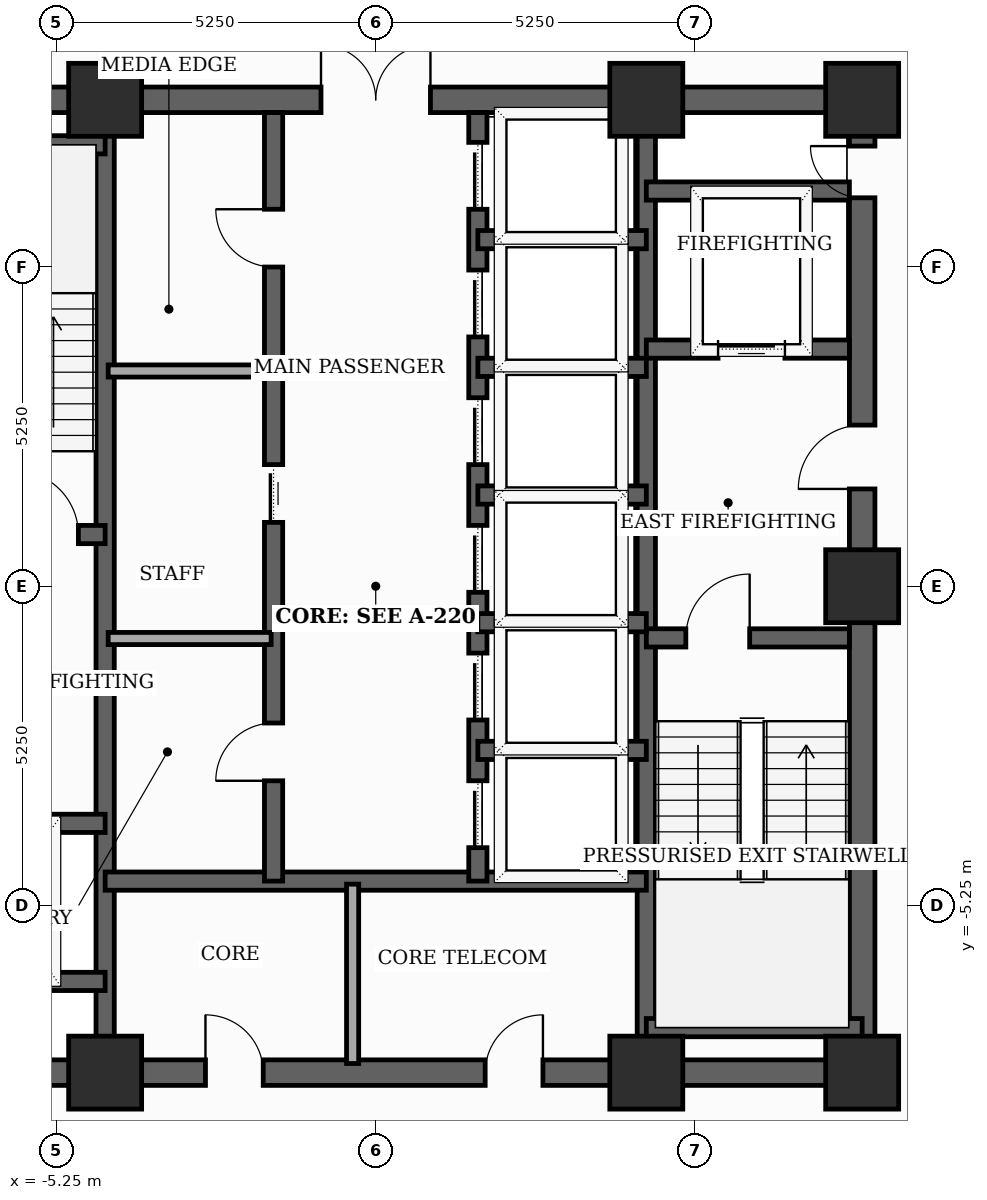
"""IFC4 building model, lengths in metres.
Left out: names, types, materials, properties, quantities, classifications, styles, units other than length and angle.
Written with IfcOpenShell. Run it as: python <this file> out.ifc"""

import sys

from ifc_helpers import new_model, si_unit, direction, frame, frame_2d, origin, origin_2d, place, context, subcontext, project, spatial, rectangle, extrude, element, fill, save


model = new_model("IFC4")
c1 = context("Model", 3, precision=1e-05, world=origin(), true_north=direction((0.0, 1.0)))
c2 = subcontext(c1, "Body", "Model", "MODEL_VIEW")
j1 = project(units=[si_unit("LENGTHUNIT", "METRE"), si_unit("PLANEANGLEUNIT", "RADIAN")], contexts=[c1])
p1 = place(None, origin())
s1 = spatial("IfcSite", under=j1, at=p1, CompositionType="ELEMENT")
p2 = place(p1, origin())
s2 = spatial("IfcBuilding", under=s1, at=p2, CompositionType="ELEMENT")
p3 = place(p2, frame((0.0, 0.0, 195.3)))
s3 = spatial("IfcBuildingStorey", under=s2, at=p3, CompositionType="ELEMENT", Elevation=195.3)
for number, where, z_axis, x_axis in (
    (1, (-4.45, -8.0, 0.0), (0.0, 0.0, 1.0), (1.0, 0.0, 0.0)),
    (2, (4.45, -8.0, 0.0), (0.0, 0.0, 1.0), (1.0, 0.0, 0.0)),
    (3, (8.0, -8.0, 0.0), (0.0, 0.0, 1.0), (1.0, 0.0, 0.0)),
    (4, (8.0, 0.0, 0.0), (0.0, 0.0, 1.0), (1.0, 0.0, 0.0)),
    (5, (8.0, 8.0, 0.0), (0.0, 0.0, 1.0), (1.0, 0.0, 0.0)),
    (6, (4.45, 8.0, 0.0), (0.0, 0.0, 1.0), (1.0, 0.0, 0.0)),
    (7, (-4.45, 8.0, 0.0), (0.0, 0.0, 1.0), (1.0, 0.0, 0.0)),
):
    element("IfcColumn", number, at=place(p3, frame(where, z_axis=z_axis, x_axis=x_axis)), inside=s3, PredefinedType="COLUMN", context=c2, shape_type="SweptSolid", body=[
        extrude(rectangle(XDim=1.2, YDim=1.2, at=origin_2d()), origin(), (0.0, 0.0, 1.0), 3.7),
    ])
p4 = place(p3, frame((8.0, -8.0, 0.0), z_axis=(0.0, 0.0, 1.0), x_axis=(0.0, 1.0, 0.0)))
e8 = element("IfcWall", 8, at=p4, inside=s3, PredefinedType="SHEAR", context=c2, shape_type="SweptSolid", body=[
    extrude(rectangle(XDim=16.0, YDim=0.42, at=frame_2d((8.0, 0.0))), origin(), (0.0, 0.0, 1.0), 3.5),
])
p5 = place(p4, frame((9.6, 0.0, 0.0)))
e9 = element("IfcOpeningElement", 9, at=p5, cuts=e8, PredefinedType="OPENING", context=c2, shape_type="SweptSolid", body=[
    extrude(rectangle(XDim=1.05, YDim=2.15, at=frame_2d((0.525, 1.075))), frame((0.0, 0.22, 0.0), z_axis=(0.0, -1.0, 0.0), x_axis=(1.0, 0.0, 0.0)), (0.0, 0.0, 1.0), 0.44),
])
p6 = place(p4, frame((14.389, 0.0, 0.0)))
e10 = element("IfcOpeningElement", 10, at=p6, cuts=e8, PredefinedType="OPENING", context=c2, shape_type="SweptSolid", body=[
    extrude(rectangle(XDim=0.85, YDim=2.02, at=frame_2d((0.425, 1.01))), frame((0.0, 0.22, 0.0), z_axis=(0.0, -1.0, 0.0), x_axis=(1.0, 0.0, 0.0)), (0.0, 0.0, 1.0), 0.44),
])
p7 = place(p3, frame((-8.0, -8.0, 0.0), z_axis=(0.0, 0.0, 1.0), x_axis=(1.0, 0.0, 0.0)))
e11 = element("IfcWall", 11, at=p7, inside=s3, PredefinedType="SHEAR", context=c2, shape_type="SweptSolid", body=[
    extrude(rectangle(XDim=16.0, YDim=0.42, at=frame_2d((8.0, 0.0))), origin(), (0.0, 0.0, 1.0), 3.5),
])
p8 = place(p7, frame((5.2, 0.0, 0.0)))
e12 = element("IfcOpeningElement", 12, at=p8, cuts=e11, PredefinedType="OPENING", context=c2, shape_type="SweptSolid", body=[
    extrude(rectangle(XDim=0.95, YDim=2.1, at=frame_2d((0.475, 1.05))), frame((0.0, 0.22, 0.0), z_axis=(0.0, -1.0, 0.0), x_axis=(1.0, 0.0, 0.0)), (0.0, 0.0, 1.0), 0.44),
])
p9 = place(p7, frame((9.8, 0.0, 0.0)))
e13 = element("IfcOpeningElement", 13, at=p9, cuts=e11, PredefinedType="OPENING", context=c2, shape_type="SweptSolid", body=[
    extrude(rectangle(XDim=0.95, YDim=2.1, at=frame_2d((0.475, 1.05))), frame((0.0, 0.22, 0.0), z_axis=(0.0, -1.0, 0.0), x_axis=(1.0, 0.0, 0.0)), (0.0, 0.0, 1.0), 0.44),
])
p10 = place(p3, frame((-8.0, 8.0, 0.0), z_axis=(0.0, 0.0, 1.0), x_axis=(1.0, 0.0, 0.0)))
e14 = element("IfcWall", 14, at=p10, inside=s3, PredefinedType="SHEAR", context=c2, shape_type="SweptSolid", body=[
    extrude(rectangle(XDim=16.0, YDim=0.42, at=frame_2d((8.0, 0.0))), origin(), (0.0, 0.0, 1.0), 3.5),
])
p11 = place(p10, frame((7.1, 0.0, 0.0)))
e15 = element("IfcOpeningElement", 15, at=p11, cuts=e14, PredefinedType="OPENING", context=c2, shape_type="SweptSolid", body=[
    extrude(rectangle(XDim=1.8, YDim=2.15, at=frame_2d((0.9, 1.075))), frame((0.0, 0.22, 0.0), z_axis=(0.0, -1.0, 0.0), x_axis=(1.0, 0.0, 0.0)), (0.0, 0.0, 1.0), 0.44),
])
for number, where, z_axis, x_axis in (
    (16, (-4.45, -7.79, 0.0), (0.0, 0.0, 1.0), (0.0, 1.0, 0.0)),
    (17, (4.45, -7.79, 0.0), (0.0, 0.0, 1.0), (0.0, 1.0, 0.0)),
):
    element("IfcWall", number, at=place(p3, frame(where, z_axis=z_axis, x_axis=x_axis)), inside=s3, PredefinedType="SHEAR", context=c2, shape_type="SweptSolid", body=[
        extrude(rectangle(XDim=15.58, YDim=0.3, at=frame_2d((7.79, 0.0))), origin(), (0.0, 0.0, 1.0), 3.5),
    ])
p12 = place(p3, frame((-7.79, 0.85, 0.0), z_axis=(0.0, 0.0, 1.0), x_axis=(1.0, 0.0, 0.0)))
e18 = element("IfcWall", 18, at=p12, inside=s3, PredefinedType="SHEAR", context=c2, shape_type="SweptSolid", body=[
    extrude(rectangle(XDim=3.34, YDim=0.3, at=frame_2d((1.67, 0.0))), origin(), (0.0, 0.0, 1.0), 3.5),
])
p13 = place(p12, frame((1.85, 0.0, 0.0)))
e19 = element("IfcOpeningElement", 19, at=p13, cuts=e18, PredefinedType="OPENING", context=c2, shape_type="SweptSolid", body=[
    extrude(rectangle(XDim=1.05, YDim=2.15, at=frame_2d((0.525, 1.075))), frame((0.0, 0.16, 0.0), z_axis=(0.0, -1.0, 0.0), x_axis=(1.0, 0.0, 0.0)), (0.0, 0.0, 1.0), 0.32),
])
p14 = place(p3, frame((-7.79, 7.26, 0.0), z_axis=(0.0, 0.0, 1.0), x_axis=(1.0, 0.0, 0.0)))
e20 = element("IfcWall", 20, at=p14, inside=s3, PredefinedType="SHEAR", context=c2, shape_type="SweptSolid", body=[
    extrude(rectangle(XDim=3.34, YDim=0.3, at=frame_2d((1.67, 0.0))), origin(), (0.0, 0.0, 1.0), 3.5),
])
p15 = place(p3, frame((4.45, -0.85, 0.0), z_axis=(0.0, 0.0, 1.0), x_axis=(1.0, 0.0, 0.0)))
e21 = element("IfcWall", 21, at=p15, inside=s3, PredefinedType="SHEAR", context=c2, shape_type="SweptSolid", body=[
    extrude(rectangle(XDim=3.34, YDim=0.3, at=frame_2d((1.67, 0.0))), origin(), (0.0, 0.0, 1.0), 3.5),
])
p16 = place(p15, frame((0.65, 0.0, 0.0)))
e22 = element("IfcOpeningElement", 22, at=p16, cuts=e21, PredefinedType="OPENING", context=c2, shape_type="SweptSolid", body=[
    extrude(rectangle(XDim=1.05, YDim=2.15, at=frame_2d((0.525, 1.075))), frame((0.0, 0.16, 0.0), z_axis=(0.0, -1.0, 0.0), x_axis=(1.0, 0.0, 0.0)), (0.0, 0.0, 1.0), 0.32),
])
p17 = place(p3, frame((4.45, -7.26, 0.0), z_axis=(0.0, 0.0, 1.0), x_axis=(1.0, 0.0, 0.0)))
e23 = element("IfcWall", 23, at=p17, inside=s3, PredefinedType="SHEAR", context=c2, shape_type="SweptSolid", body=[
    extrude(rectangle(XDim=3.55, YDim=0.3, at=frame_2d((1.775, 0.0))), origin(), (0.0, 0.0, 1.0), 3.5),
])
p18 = place(p3, frame((-7.79, -3.9, 0.0), z_axis=(0.0, 0.0, 1.0), x_axis=(1.0, 0.0, 0.0)))
e24 = element("IfcWall", 24, at=p18, inside=s3, PredefinedType="SHEAR", context=c2, shape_type="SweptSolid", body=[
    extrude(rectangle(XDim=3.34, YDim=0.3, at=frame_2d((1.67, 0.0))), origin(), (0.0, 0.0, 1.0), 3.5),
])
p19 = place(p18, frame((1.27, 0.0, 0.0)))
e25 = element("IfcOpeningElement", 25, at=p19, cuts=e24, PredefinedType="OPENING", context=c2, shape_type="SweptSolid", body=[
    extrude(rectangle(XDim=1.1, YDim=2.1, at=frame_2d((0.55, 1.05))), frame((0.0, 0.16, 0.0), z_axis=(0.0, -1.0, 0.0), x_axis=(1.0, 0.0, 0.0)), (0.0, 0.0, 1.0), 0.32),
])
p20 = place(p3, frame((-7.79, -6.5, 0.0), z_axis=(0.0, 0.0, 1.0), x_axis=(1.0, 0.0, 0.0)))
e26 = element("IfcWall", 26, at=p20, inside=s3, PredefinedType="SHEAR", context=c2, shape_type="SweptSolid", body=[
    extrude(rectangle(XDim=3.34, YDim=0.3, at=frame_2d((1.67, 0.0))), origin(), (0.0, 0.0, 1.0), 3.5),
])
p21 = place(p3, frame((4.45, 3.9, 0.0), z_axis=(0.0, 0.0, 1.0), x_axis=(1.0, 0.0, 0.0)))
e27 = element("IfcWall", 27, at=p21, inside=s3, PredefinedType="SHEAR", context=c2, shape_type="SweptSolid", body=[
    extrude(rectangle(XDim=3.34, YDim=0.3, at=frame_2d((1.67, 0.0))), origin(), (0.0, 0.0, 1.0), 3.5),
])
p22 = place(p21, frame((1.18, 0.0, 0.0)))
e28 = element("IfcOpeningElement", 28, at=p22, cuts=e27, PredefinedType="OPENING", context=c2, shape_type="SweptSolid", body=[
    extrude(rectangle(XDim=1.1, YDim=2.1, at=frame_2d((0.55, 1.05))), frame((0.0, 0.16, 0.0), z_axis=(0.0, -1.0, 0.0), x_axis=(1.0, 0.0, 0.0)), (0.0, 0.0, 1.0), 0.32),
])
p23 = place(p3, frame((4.45, 6.5, 0.0), z_axis=(0.0, 0.0, 1.0), x_axis=(1.0, 0.0, 0.0)))
e29 = element("IfcWall", 29, at=p23, inside=s3, PredefinedType="SHEAR", context=c2, shape_type="SweptSolid", body=[
    extrude(rectangle(XDim=3.34, YDim=0.3, at=frame_2d((1.67, 0.0))), origin(), (0.0, 0.0, 1.0), 3.5),
])
p24 = place(p3, frame((-4.45, -4.85, 0.0), z_axis=(0.0, 0.0, 1.0), x_axis=(1.0, 0.0, 0.0)))
e30 = element("IfcWall", 30, at=p24, inside=s3, PredefinedType="SHEAR", context=c2, shape_type="SweptSolid", body=[
    extrude(rectangle(XDim=8.9, YDim=0.3, at=frame_2d((4.45, 0.0))), origin(), (0.0, 0.0, 1.0), 3.5),
])
p25 = place(p3, frame((-1.68, -4.85, 0.0), z_axis=(0.0, 0.0, 1.0), x_axis=(0.0, 1.0, 0.0)))
e31 = element("IfcWall", 31, at=p25, inside=s3, PredefinedType="SHEAR", context=c2, shape_type="SweptSolid", body=[
    extrude(rectangle(XDim=12.64, YDim=0.3, at=frame_2d((6.32, 0.0))), origin(), (0.0, 0.0, 1.0), 3.5),
])
p26 = place(p25, frame((1.65, 0.0, 0.0)))
e32 = element("IfcOpeningElement", 32, at=p26, cuts=e31, PredefinedType="OPENING", context=c2, shape_type="SweptSolid", body=[
    extrude(rectangle(XDim=0.95, YDim=2.1, at=frame_2d((0.475, 1.05))), frame((0.0, 0.16, 0.0), z_axis=(0.0, -1.0, 0.0), x_axis=(1.0, 0.0, 0.0)), (0.0, 0.0, 1.0), 0.32),
])
p27 = place(p25, frame((5.9, 0.0, 0.0)))
e33 = element("IfcOpeningElement", 33, at=p27, cuts=e31, PredefinedType="OPENING", context=c2, shape_type="SweptSolid", body=[
    extrude(rectangle(XDim=0.95, YDim=2.1, at=frame_2d((0.475, 1.05))), frame((0.0, 0.16, 0.0), z_axis=(0.0, -1.0, 0.0), x_axis=(1.0, 0.0, 0.0)), (0.0, 0.0, 1.0), 0.32),
])
p28 = place(p25, frame((10.1, 0.0, 0.0)))
e34 = element("IfcOpeningElement", 34, at=p28, cuts=e31, PredefinedType="OPENING", context=c2, shape_type="SweptSolid", body=[
    extrude(rectangle(XDim=0.95, YDim=2.1, at=frame_2d((0.475, 1.05))), frame((0.0, 0.16, 0.0), z_axis=(0.0, -1.0, 0.0), x_axis=(1.0, 0.0, 0.0)), (0.0, 0.0, 1.0), 0.32),
])
p29 = place(p3, frame((1.68, -4.85, 0.0), z_axis=(0.0, 0.0, 1.0), x_axis=(0.0, 1.0, 0.0)))
e35 = element("IfcWall", 35, at=p29, inside=s3, PredefinedType="SHEAR", context=c2, shape_type="SweptSolid", body=[
    extrude(rectangle(XDim=12.64, YDim=0.3, at=frame_2d((6.32, 0.0))), origin(), (0.0, 0.0, 1.0), 3.5),
])
p30 = place(p29, frame((0.55, 0.0, 0.0)))
e36 = element("IfcOpeningElement", 36, at=p30, cuts=e35, PredefinedType="OPENING", context=c2, shape_type="SweptSolid", body=[
    extrude(rectangle(XDim=1.1, YDim=2.1, at=frame_2d((0.55, 1.05))), frame((0.0, 0.16, 0.0), z_axis=(0.0, -1.0, 0.0), x_axis=(1.0, 0.0, 0.0)), (0.0, 0.0, 1.0), 0.32),
])
p31 = place(p29, frame((2.65, 0.0, 0.0)))
e37 = element("IfcOpeningElement", 37, at=p31, cuts=e35, PredefinedType="OPENING", context=c2, shape_type="SweptSolid", body=[
    extrude(rectangle(XDim=1.1, YDim=2.1, at=frame_2d((0.55, 1.05))), frame((0.0, 0.16, 0.0), z_axis=(0.0, -1.0, 0.0), x_axis=(1.0, 0.0, 0.0)), (0.0, 0.0, 1.0), 0.32),
])
p32 = place(p29, frame((4.75, 0.0, 0.0)))
e38 = element("IfcOpeningElement", 38, at=p32, cuts=e35, PredefinedType="OPENING", context=c2, shape_type="SweptSolid", body=[
    extrude(rectangle(XDim=1.1, YDim=2.1, at=frame_2d((0.55, 1.05))), frame((0.0, 0.16, 0.0), z_axis=(0.0, -1.0, 0.0), x_axis=(1.0, 0.0, 0.0)), (0.0, 0.0, 1.0), 0.32),
])
p33 = place(p29, frame((6.85, 0.0, 0.0)))
e39 = element("IfcOpeningElement", 39, at=p33, cuts=e35, PredefinedType="OPENING", context=c2, shape_type="SweptSolid", body=[
    extrude(rectangle(XDim=1.1, YDim=2.1, at=frame_2d((0.55, 1.05))), frame((0.0, 0.16, 0.0), z_axis=(0.0, -1.0, 0.0), x_axis=(1.0, 0.0, 0.0)), (0.0, 0.0, 1.0), 0.32),
])
p34 = place(p29, frame((8.95, 0.0, 0.0)))
e40 = element("IfcOpeningElement", 40, at=p34, cuts=e35, PredefinedType="OPENING", context=c2, shape_type="SweptSolid", body=[
    extrude(rectangle(XDim=1.1, YDim=2.1, at=frame_2d((0.55, 1.05))), frame((0.0, 0.16, 0.0), z_axis=(0.0, -1.0, 0.0), x_axis=(1.0, 0.0, 0.0)), (0.0, 0.0, 1.0), 0.32),
])
p35 = place(p29, frame((11.05, 0.0, 0.0)))
e41 = element("IfcOpeningElement", 41, at=p35, cuts=e35, PredefinedType="OPENING", context=c2, shape_type="SweptSolid", body=[
    extrude(rectangle(XDim=1.1, YDim=2.1, at=frame_2d((0.55, 1.05))), frame((0.0, 0.16, 0.0), z_axis=(0.0, -1.0, 0.0), x_axis=(1.0, 0.0, 0.0)), (0.0, 0.0, 1.0), 0.32),
])
for number, where, z_axis, x_axis in (
    (42, (1.68, 1.5, 0.0), (0.0, 0.0, 1.0), (1.0, 0.0, 0.0)),
    (43, (1.68, 3.6, 0.0), (0.0, 0.0, 1.0), (1.0, 0.0, 0.0)),
    (44, (1.68, 5.7, 0.0), (0.0, 0.0, 1.0), (1.0, 0.0, 0.0)),
    (45, (1.68, -2.7, 0.0), (0.0, 0.0, 1.0), (1.0, 0.0, 0.0)),
    (46, (1.68, -0.6, 0.0), (0.0, 0.0, 1.0), (1.0, 0.0, 0.0)),
):
    element("IfcWall", number, at=place(p3, frame(where, z_axis=z_axis, x_axis=x_axis)), inside=s3, PredefinedType="SHEAR", context=c2, shape_type="SweptSolid", body=[
        extrude(rectangle(XDim=2.77, YDim=0.3, at=frame_2d((1.385, 0.0))), origin(), (0.0, 0.0, 1.0), 3.5),
    ])
p36 = place(p3, frame((-0.38, -7.85, 0.0), z_axis=(0.0, 0.0, 1.0), x_axis=(0.0, 1.0, 0.0)))
e47 = element("IfcWall", 47, at=p36, inside=s3, PredefinedType="SOLIDWALL", context=c2, shape_type="SweptSolid", body=[
    extrude(rectangle(XDim=2.95, YDim=0.2, at=frame_2d((1.475, 0.0))), origin(), (0.0, 0.0, 1.0), 2.885),
])
for number, where, z_axis, x_axis in (
    (48, (-4.4, -0.86, 0.0), (0.0, 0.0, 1.0), (1.0, 0.0, 0.0)),
    (49, (-4.4, 3.54, 0.0), (0.0, 0.0, 1.0), (1.0, 0.0, 0.0)),
):
    element("IfcWall", number, at=place(p3, frame(where, z_axis=z_axis, x_axis=x_axis)), inside=s3, PredefinedType="SOLIDWALL", context=c2, shape_type="SweptSolid", body=[
        extrude(rectangle(XDim=2.68, YDim=0.2, at=frame_2d((1.34, 0.0))), origin(), (0.0, 0.0, 1.0), 3.5),
    ])
p37 = place(p5, origin())
e50 = element("IfcDoor", 50, at=p37, inside=s3, OperationType="SINGLE_SWING_LEFT", PredefinedType="DOOR", context=c2, shape_type="SweptSolid", body=[
    extrude(rectangle(XDim=1.05, YDim=2.15, at=frame_2d((0.525, 1.075))), frame((0.0, 0.025, 0.0), z_axis=(0.0, -1.0, 0.0), x_axis=(1.0, 0.0, 0.0)), (0.0, 0.0, 1.0), 0.05),
])
fill(e9, e50)
p38 = place(p6, origin())
e51 = element("IfcDoor", 51, at=p38, inside=s3, OperationType="SINGLE_SWING_RIGHT", PredefinedType="TRAPDOOR", context=c2, shape_type="SweptSolid", body=[
    extrude(rectangle(XDim=0.85, YDim=2.02, at=frame_2d((0.425, 1.01))), frame((0.0, 0.025, 0.0), z_axis=(0.0, -1.0, 0.0), x_axis=(1.0, 0.0, 0.0)), (0.0, 0.0, 1.0), 0.05),
])
fill(e10, e51)
p39 = place(p8, origin())
e52 = element("IfcDoor", 52, at=p39, inside=s3, OperationType="SINGLE_SWING_LEFT", PredefinedType="DOOR", context=c2, shape_type="SweptSolid", body=[
    extrude(rectangle(XDim=0.95, YDim=2.1, at=frame_2d((0.475, 1.05))), frame((0.0, 0.025, 0.0), z_axis=(0.0, -1.0, 0.0), x_axis=(1.0, 0.0, 0.0)), (0.0, 0.0, 1.0), 0.05),
])
fill(e12, e52)
p40 = place(p9, origin())
e53 = element("IfcDoor", 53, at=p40, inside=s3, OperationType="SINGLE_SWING_RIGHT", PredefinedType="DOOR", context=c2, shape_type="SweptSolid", body=[
    extrude(rectangle(XDim=0.95, YDim=2.1, at=frame_2d((0.475, 1.05))), frame((0.0, 0.025, 0.0), z_axis=(0.0, -1.0, 0.0), x_axis=(1.0, 0.0, 0.0)), (0.0, 0.0, 1.0), 0.05),
])
fill(e13, e53)
p41 = place(p11, origin())
e54 = element("IfcDoor", 54, at=p41, inside=s3, OperationType="DOUBLE_DOOR_SINGLE_SWING", PredefinedType="DOOR", context=c2, shape_type="SweptSolid", body=[
    extrude(rectangle(XDim=1.8, YDim=2.15, at=frame_2d((0.9, 1.075))), frame((0.0, 0.025, 0.0), z_axis=(0.0, -1.0, 0.0), x_axis=(1.0, 0.0, 0.0)), (0.0, 0.0, 1.0), 0.05),
])
fill(e15, e54)
p42 = place(p13, origin())
e55 = element("IfcDoor", 55, at=p42, inside=s3, OperationType="SINGLE_SWING_LEFT", PredefinedType="DOOR", context=c2, shape_type="SweptSolid", body=[
    extrude(rectangle(XDim=1.05, YDim=2.15, at=frame_2d((0.525, 1.075))), frame((0.0, 0.025, 0.0), z_axis=(0.0, -1.0, 0.0), x_axis=(1.0, 0.0, 0.0)), (0.0, 0.0, 1.0), 0.05),
])
fill(e19, e55)
p43 = place(p16, origin())
e56 = element("IfcDoor", 56, at=p43, inside=s3, OperationType="SINGLE_SWING_RIGHT", PredefinedType="DOOR", context=c2, shape_type="SweptSolid", body=[
    extrude(rectangle(XDim=1.05, YDim=2.15, at=frame_2d((0.525, 1.075))), frame((0.0, 0.025, 0.0), z_axis=(0.0, -1.0, 0.0), x_axis=(1.0, 0.0, 0.0)), (0.0, 0.0, 1.0), 0.05),
])
fill(e22, e56)
p44 = place(p22, origin())
e57 = element("IfcDoor", 57, at=p44, inside=s3, OperationType="SLIDING_TO_LEFT", PredefinedType="DOOR", context=c2, shape_type="SweptSolid", body=[
    extrude(rectangle(XDim=1.1, YDim=2.1, at=frame_2d((0.55, 1.05))), frame((0.0, 0.025, 0.0), z_axis=(0.0, -1.0, 0.0), x_axis=(1.0, 0.0, 0.0)), (0.0, 0.0, 1.0), 0.05),
])
fill(e28, e57)
p45 = place(p26, origin())
e58 = element("IfcDoor", 58, at=p45, inside=s3, OperationType="SINGLE_SWING_LEFT", PredefinedType="DOOR", context=c2, shape_type="SweptSolid", body=[
    extrude(rectangle(XDim=0.95, YDim=2.1, at=frame_2d((0.475, 1.05))), frame((0.0, 0.025, 0.0), z_axis=(0.0, -1.0, 0.0), x_axis=(1.0, 0.0, 0.0)), (0.0, 0.0, 1.0), 0.05),
])
fill(e32, e58)
p46 = place(p27, origin())
e59 = element("IfcDoor", 59, at=p46, inside=s3, OperationType="SLIDING_TO_LEFT", PredefinedType="DOOR", context=c2, shape_type="SweptSolid", body=[
    extrude(rectangle(XDim=0.95, YDim=2.1, at=frame_2d((0.475, 1.05))), frame((0.0, 0.025, 0.0), z_axis=(0.0, -1.0, 0.0), x_axis=(1.0, 0.0, 0.0)), (0.0, 0.0, 1.0), 0.05),
])
fill(e33, e59)
p47 = place(p28, origin())
e60 = element("IfcDoor", 60, at=p47, inside=s3, OperationType="SINGLE_SWING_RIGHT", PredefinedType="DOOR", context=c2, shape_type="SweptSolid", body=[
    extrude(rectangle(XDim=0.95, YDim=2.1, at=frame_2d((0.475, 1.05))), frame((0.0, 0.025, 0.0), z_axis=(0.0, -1.0, 0.0), x_axis=(1.0, 0.0, 0.0)), (0.0, 0.0, 1.0), 0.05),
])
fill(e34, e60)
p48 = place(p30, origin())
e61 = element("IfcDoor", 61, at=p48, inside=s3, OperationType="SLIDING_TO_LEFT", PredefinedType="DOOR", context=c2, shape_type="SweptSolid", body=[
    extrude(rectangle(XDim=1.1, YDim=2.1, at=frame_2d((0.55, 1.05))), frame((0.0, 0.025, 0.0), z_axis=(0.0, -1.0, 0.0), x_axis=(1.0, 0.0, 0.0)), (0.0, 0.0, 1.0), 0.05),
])
fill(e36, e61)
p49 = place(p31, origin())
e62 = element("IfcDoor", 62, at=p49, inside=s3, OperationType="SLIDING_TO_LEFT", PredefinedType="DOOR", context=c2, shape_type="SweptSolid", body=[
    extrude(rectangle(XDim=1.1, YDim=2.1, at=frame_2d((0.55, 1.05))), frame((0.0, 0.025, 0.0), z_axis=(0.0, -1.0, 0.0), x_axis=(1.0, 0.0, 0.0)), (0.0, 0.0, 1.0), 0.05),
])
fill(e37, e62)
p50 = place(p32, origin())
e63 = element("IfcDoor", 63, at=p50, inside=s3, OperationType="SLIDING_TO_LEFT", PredefinedType="DOOR", context=c2, shape_type="SweptSolid", body=[
    extrude(rectangle(XDim=1.1, YDim=2.1, at=frame_2d((0.55, 1.05))), frame((0.0, 0.025, 0.0), z_axis=(0.0, -1.0, 0.0), x_axis=(1.0, 0.0, 0.0)), (0.0, 0.0, 1.0), 0.05),
])
fill(e38, e63)
p51 = place(p33, origin())
e64 = element("IfcDoor", 64, at=p51, inside=s3, OperationType="SLIDING_TO_LEFT", PredefinedType="DOOR", context=c2, shape_type="SweptSolid", body=[
    extrude(rectangle(XDim=1.1, YDim=2.1, at=frame_2d((0.55, 1.05))), frame((0.0, 0.025, 0.0), z_axis=(0.0, -1.0, 0.0), x_axis=(1.0, 0.0, 0.0)), (0.0, 0.0, 1.0), 0.05),
])
fill(e39, e64)
p52 = place(p34, origin())
e65 = element("IfcDoor", 65, at=p52, inside=s3, OperationType="SLIDING_TO_LEFT", PredefinedType="DOOR", context=c2, shape_type="SweptSolid", body=[
    extrude(rectangle(XDim=1.1, YDim=2.1, at=frame_2d((0.55, 1.05))), frame((0.0, 0.025, 0.0), z_axis=(0.0, -1.0, 0.0), x_axis=(1.0, 0.0, 0.0)), (0.0, 0.0, 1.0), 0.05),
])
fill(e40, e65)
p53 = place(p35, origin())
e66 = element("IfcDoor", 66, at=p53, inside=s3, OperationType="SLIDING_TO_LEFT", PredefinedType="DOOR", context=c2, shape_type="SweptSolid", body=[
    extrude(rectangle(XDim=1.1, YDim=2.1, at=frame_2d((0.55, 1.05))), frame((0.0, 0.025, 0.0), z_axis=(0.0, -1.0, 0.0), x_axis=(1.0, 0.0, 0.0)), (0.0, 0.0, 1.0), 0.05),
])
fill(e41, e66)
save(model, sys.argv[1])
